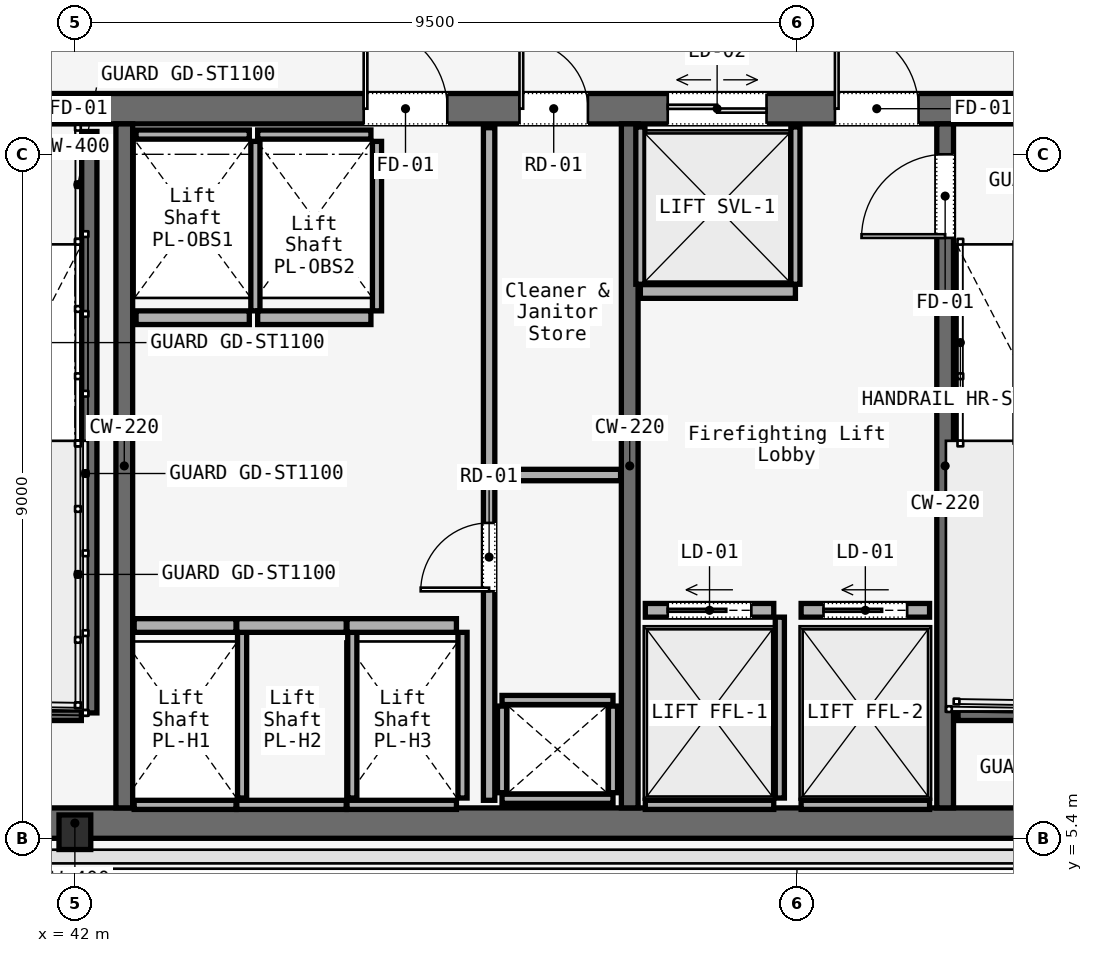
"""IFC4 building model, lengths in metres.
Left out: names, types, materials, properties, quantities, classifications, styles, units other than length and angle.
Written with IfcOpenShell. Run it as: python <this file> out.ifc"""

import sys

from ifc_helpers import new_model, si_unit, direction, frame, frame_2d, origin, origin_2d, place, context, subcontext, project, spatial, rectangle, i_section, extrude, element, fill, save


model = new_model("IFC4")
c1 = context("Model", 3, precision=1e-05, world=origin(), true_north=direction((0.0, 1.0)))
c2 = subcontext(c1, "Body", "Model", "MODEL_VIEW")
j1 = project(units=[si_unit("LENGTHUNIT", "METRE"), si_unit("PLANEANGLEUNIT", "RADIAN")], contexts=[c1])
p1 = place(None, origin())
s1 = spatial("IfcSite", under=j1, at=p1, CompositionType="ELEMENT")
p2 = place(p1, origin())
s2 = spatial("IfcBuilding", under=s1, at=p2, CompositionType="ELEMENT")
p3 = place(p2, frame((0.0, 0.0, 161.2)))
s3 = spatial("IfcBuildingStorey", under=s2, at=p3, CompositionType="ELEMENT", Elevation=161.2)
p4 = place(p3, frame((26.45, 15.0, 0.0), z_axis=(0.0, 0.0, 1.0), x_axis=(1.0, 0.0, 0.0)))
e1 = element("IfcWall", 1, at=p4, inside=s3, PredefinedType="SOLIDWALL", context=c2, shape_type="SweptSolid", body=[
    extrude(rectangle(XDim=31.1, YDim=0.4, at=frame_2d((15.55, 0.0))), origin(), (0.0, 0.0, 1.0), 3.58),
])
p5 = place(p4, frame((1.65, 0.0, 0.0)))
e2 = element("IfcOpeningElement", 2, at=p5, cuts=e1, PredefinedType="OPENING", context=c2, shape_type="SweptSolid", body=[
    extrude(rectangle(XDim=1.1, YDim=2.2, at=frame_2d((0.55, 1.1))), frame((0.0, 0.2, 0.0), z_axis=(0.0, -1.0, 0.0), x_axis=(1.0, 0.0, 0.0)), (0.0, 0.0, 1.0), 0.4),
])
p6 = place(p4, frame((13.65, 0.0, 0.0)))
e3 = element("IfcOpeningElement", 3, at=p6, cuts=e1, PredefinedType="OPENING", context=c2, shape_type="SweptSolid", body=[
    extrude(rectangle(XDim=1.1, YDim=2.2, at=frame_2d((0.55, 1.1))), frame((0.0, 0.2, 0.0), z_axis=(0.0, -1.0, 0.0), x_axis=(1.0, 0.0, 0.0)), (0.0, 0.0, 1.0), 0.4),
])
p7 = place(p4, frame((25.55, 0.0, 0.0)))
e4 = element("IfcOpeningElement", 4, at=p7, cuts=e1, PredefinedType="OPENING", context=c2, shape_type="SweptSolid", body=[
    extrude(rectangle(XDim=1.1, YDim=2.2, at=frame_2d((0.55, 1.1))), frame((0.0, 0.2, 0.0), z_axis=(0.0, -1.0, 0.0), x_axis=(1.0, 0.0, 0.0)), (0.0, 0.0, 1.0), 0.4),
])
p8 = place(p4, frame((10.7, 0.0, 0.0)))
e5 = element("IfcOpeningElement", 5, at=p8, cuts=e1, PredefinedType="OPENING", context=c2, shape_type="SweptSolid", body=[
    extrude(rectangle(XDim=1.4, YDim=2.2, at=frame_2d((0.7, 1.1))), frame((0.0, 0.2, 0.0), z_axis=(0.0, -1.0, 0.0), x_axis=(1.0, 0.0, 0.0)), (0.0, 0.0, 1.0), 0.4),
])
p9 = place(p4, frame((19.35, 0.0, 0.0)))
e6 = element("IfcOpeningElement", 6, at=p9, cuts=e1, PredefinedType="OPENING", context=c2, shape_type="SweptSolid", body=[
    extrude(rectangle(XDim=1.1, YDim=2.2, at=frame_2d((0.55, 1.1))), frame((0.0, 0.2, 0.0), z_axis=(0.0, -1.0, 0.0), x_axis=(1.0, 0.0, 0.0)), (0.0, 0.0, 1.0), 0.4),
])
p10 = place(p4, frame((21.4, 0.0, 0.0)))
e7 = element("IfcOpeningElement", 7, at=p10, cuts=e1, PredefinedType="OPENING", context=c2, shape_type="SweptSolid", body=[
    extrude(rectangle(XDim=0.9, YDim=2.1, at=frame_2d((0.45, 1.05))), frame((0.0, 0.2, 0.0), z_axis=(0.0, -1.0, 0.0), x_axis=(1.0, 0.0, 0.0)), (0.0, 0.0, 1.0), 0.4),
])
p11 = place(p4, frame((23.35, 0.0, 0.0)))
e8 = element("IfcOpeningElement", 8, at=p11, cuts=e1, PredefinedType="OPENING", context=c2, shape_type="SweptSolid", body=[
    extrude(rectangle(XDim=1.3, YDim=2.3, at=frame_2d((0.65, 1.15))), frame((0.0, 0.2, 0.0), z_axis=(0.0, -1.0, 0.0), x_axis=(1.0, 0.0, 0.0)), (0.0, 0.0, 1.0), 0.4),
])
p12 = place(p3, frame((26.45, 5.6, 0.0), z_axis=(0.0, 0.0, 1.0), x_axis=(1.0, 0.0, 0.0)))
e9 = element("IfcWall", 9, at=p12, inside=s3, PredefinedType="SOLIDWALL", context=c2, shape_type="SweptSolid", body=[
    extrude(rectangle(XDim=31.1, YDim=0.4, at=frame_2d((15.55, 0.0))), origin(), (0.0, 0.0, 1.0), 3.58),
])
for number, where, z_axis, x_axis in (
    (10, (42.65, 5.8, 0.0), (0.0, 0.0, 1.0), (0.0, 1.0, 0.0)),
    (11, (49.3, 5.8, 0.0), (0.0, 0.0, 1.0), (0.0, 1.0, 0.0)),
):
    element("IfcWall", number, at=place(p3, frame(where, z_axis=z_axis, x_axis=x_axis)), inside=s3, PredefinedType="SOLIDWALL", context=c2, shape_type="SweptSolid", body=[
        extrude(rectangle(XDim=9.0, YDim=0.22, at=frame_2d((4.5, 0.0))), origin(), (0.0, 0.0, 1.0), 3.58),
    ])
p13 = place(p3, frame((53.45, 5.8, 0.0), z_axis=(0.0, 0.0, 1.0), x_axis=(0.0, 1.0, 0.0)))
e12 = element("IfcWall", 12, at=p13, inside=s3, PredefinedType="SOLIDWALL", context=c2, shape_type="SweptSolid", body=[
    extrude(rectangle(XDim=9.0, YDim=0.22, at=frame_2d((4.5, 0.0))), origin(), (0.0, 0.0, 1.0), 3.58),
])
p14 = place(p13, frame((7.5, 0.0, 0.0)))
e13 = element("IfcOpeningElement", 13, at=p14, cuts=e12, PredefinedType="OPENING", context=c2, shape_type="SweptSolid", body=[
    extrude(rectangle(XDim=1.1, YDim=2.2, at=frame_2d((0.55, 1.1))), frame((0.0, 0.11, 0.0), z_axis=(0.0, -1.0, 0.0), x_axis=(1.0, 0.0, 0.0)), (0.0, 0.0, 1.0), 0.22),
])
p15 = place(p3, frame((42.0, 5.48, 0.0), z_axis=(0.0, 0.0, 1.0), x_axis=(1.0, 0.0, 0.0)))
e14 = element("IfcColumn", 14, at=p15, inside=s3, PredefinedType="COLUMN", context=c2, shape_type="SweptSolid", body=[
    extrude(i_section(OverallWidth=0.418, OverallDepth=0.455, WebThickness=0.042, FlangeThickness=0.052, FilletRadius=0.015, at=origin_2d()), origin(), (0.0, 0.0, 1.0), 3.58),
])
p16 = place(p3, frame((42.19, 14.7, 0.0), z_axis=(0.0, 0.0, 1.0), x_axis=(0.0, -1.0, 0.0)))
e15 = element("IfcWall", 15, at=p16, inside=s3, PredefinedType="SOLIDWALL", context=c2, shape_type="SweptSolid", body=[
    extrude(rectangle(XDim=7.65, YDim=0.2, at=frame_2d((3.825, 0.0))), origin(), (0.0, 0.0, 1.0), 3.8),
])
for number, where, z_axis, x_axis in (
    (16, (38.97, 7.05, 0.0), (0.0, 0.0, 1.0), (1.0, 0.0, 0.0)),
    (17, (53.62, 7.05, 0.0), (0.0, 0.0, 1.0), (1.0, 0.0, 0.0)),
):
    element("IfcWall", number, at=place(p3, frame(where, z_axis=z_axis, x_axis=x_axis)), inside=s3, PredefinedType="SOLIDWALL", context=c2, shape_type="SweptSolid", body=[
        extrude(rectangle(XDim=3.115, YDim=0.2, at=frame_2d((1.558, 0.0))), origin(), (0.0, 0.0, 1.0), 3.8),
    ])
for number, where, z_axis, x_axis in (
    (18, (47.62, 5.92, 0.0), (0.0, 0.0, 1.0), (1.0, 0.0, 0.0)),
    (19, (47.62, 7.22, 0.0), (0.0, 0.0, 1.0), (1.0, 0.0, 0.0)),
):
    element("IfcWall", number, at=place(p3, frame(where, z_axis=z_axis, x_axis=x_axis)), inside=s3, PredefinedType="SOLIDWALL", context=c2, shape_type="SweptSolid", body=[
        extrude(rectangle(XDim=1.46, YDim=0.12, at=frame_2d((0.73, 0.0))), origin(), (0.0, 0.0, 1.0), 3.01),
    ])
for number, where, z_axis, x_axis in (
    (20, (47.62, 6.0, 0.0), (0.0, 0.0, 1.0), (0.0, 1.0, 0.0)),
    (21, (49.08, 6.0, 0.0), (0.0, 0.0, 1.0), (0.0, 1.0, 0.0)),
):
    element("IfcWall", number, at=place(p3, frame(where, z_axis=z_axis, x_axis=x_axis)), inside=s3, PredefinedType="SOLIDWALL", context=c2, shape_type="SweptSolid", body=[
        extrude(rectangle(XDim=1.14, YDim=0.12, at=frame_2d((0.57, 0.0))), origin(), (0.0, 0.0, 1.0), 3.01),
    ])
p17 = place(p3, frame((47.45, 5.9, 0.0), z_axis=(0.0, 0.0, 1.0), x_axis=(0.0, 1.0, 0.0)))
e22 = element("IfcWall", 22, at=p17, inside=s3, PredefinedType="PARTITIONING", context=c2, shape_type="SweptSolid", body=[
    extrude(rectangle(XDim=8.85, YDim=0.15, at=frame_2d((4.425, 0.0))), origin(), (0.0, 0.0, 1.0), 3.01),
])
p18 = place(p17, frame((2.75, 0.0, 0.0)))
e23 = element("IfcOpeningElement", 23, at=p18, cuts=e22, PredefinedType="OPENING", context=c2, shape_type="SweptSolid", body=[
    extrude(rectangle(XDim=0.9, YDim=2.1, at=frame_2d((0.45, 1.05))), frame((0.0, 0.075, 0.0), z_axis=(0.0, -1.0, 0.0), x_axis=(1.0, 0.0, 0.0)), (0.0, 0.0, 1.0), 0.15),
])
p19 = place(p3, frame((47.45, 10.18, 0.0), z_axis=(0.0, 0.0, 1.0), x_axis=(1.0, 0.0, 0.0)))
e24 = element("IfcWall", 24, at=p19, inside=s3, PredefinedType="PARTITIONING", context=c2, shape_type="SweptSolid", body=[
    extrude(rectangle(XDim=1.73, YDim=0.15, at=frame_2d((0.865, 0.0))), origin(), (0.0, 0.0, 1.0), 3.01),
])
p20 = place(p3, frame((42.78, 8.2, 0.0), z_axis=(0.0, 0.0, 1.0), x_axis=(1.0, 0.0, 0.0)))
e25 = element("IfcWall", 25, at=p20, inside=s3, PredefinedType="SOLIDWALL", context=c2, shape_type="SweptSolid", body=[
    extrude(rectangle(XDim=1.34, YDim=0.18, at=frame_2d((0.67, 0.0))), origin(), (0.0, 0.0, 1.0), 3.01),
])
p21 = place(p3, frame((42.78, 5.84, 0.0), z_axis=(0.0, 0.0, 1.0), x_axis=(1.0, 0.0, 0.0)))
e26 = element("IfcWall", 26, at=p21, inside=s3, PredefinedType="SOLIDWALL", context=c2, shape_type="SweptSolid", body=[
    extrude(rectangle(XDim=1.34, YDim=0.12, at=frame_2d((0.67, 0.0))), origin(), (0.0, 0.0, 1.0), 3.01),
])
p22 = place(p3, frame((44.2, 5.93, 0.0), z_axis=(0.0, 0.0, 1.0), x_axis=(0.0, 1.0, 0.0)))
e27 = element("IfcWall", 27, at=p22, inside=s3, PredefinedType="SOLIDWALL", context=c2, shape_type="SweptSolid", body=[
    extrude(rectangle(XDim=2.18, YDim=0.12, at=frame_2d((1.09, 0.0))), origin(), (0.0, 0.0, 1.0), 3.01),
])
p23 = place(p3, frame((44.13, 8.2, 0.0), z_axis=(0.0, 0.0, 1.0), x_axis=(1.0, 0.0, 0.0)))
e28 = element("IfcWall", 28, at=p23, inside=s3, PredefinedType="SOLIDWALL", context=c2, shape_type="SweptSolid", body=[
    extrude(rectangle(XDim=1.44, YDim=0.18, at=frame_2d((0.72, 0.0))), origin(), (0.0, 0.0, 1.0), 3.01),
])
p24 = place(p3, frame((44.13, 5.84, 0.0), z_axis=(0.0, 0.0, 1.0), x_axis=(1.0, 0.0, 0.0)))
e29 = element("IfcWall", 29, at=p24, inside=s3, PredefinedType="SOLIDWALL", context=c2, shape_type="SweptSolid", body=[
    extrude(rectangle(XDim=1.44, YDim=0.12, at=frame_2d((0.72, 0.0))), origin(), (0.0, 0.0, 1.0), 3.01),
])
p25 = place(p3, frame((45.65, 5.93, 0.0), z_axis=(0.0, 0.0, 1.0), x_axis=(0.0, 1.0, 0.0)))
e30 = element("IfcWall", 30, at=p25, inside=s3, PredefinedType="SOLIDWALL", context=c2, shape_type="SweptSolid", body=[
    extrude(rectangle(XDim=2.18, YDim=0.12, at=frame_2d((1.09, 0.0))), origin(), (0.0, 0.0, 1.0), 3.01),
])
p26 = place(p3, frame((45.58, 8.2, 0.0), z_axis=(0.0, 0.0, 1.0), x_axis=(1.0, 0.0, 0.0)))
e31 = element("IfcWall", 31, at=p26, inside=s3, PredefinedType="SOLIDWALL", context=c2, shape_type="SweptSolid", body=[
    extrude(rectangle(XDim=1.44, YDim=0.18, at=frame_2d((0.72, 0.0))), origin(), (0.0, 0.0, 1.0), 3.01),
])
p27 = place(p3, frame((45.58, 5.84, 0.0), z_axis=(0.0, 0.0, 1.0), x_axis=(1.0, 0.0, 0.0)))
e32 = element("IfcWall", 32, at=p27, inside=s3, PredefinedType="SOLIDWALL", context=c2, shape_type="SweptSolid", body=[
    extrude(rectangle(XDim=1.44, YDim=0.12, at=frame_2d((0.72, 0.0))), origin(), (0.0, 0.0, 1.0), 3.01),
])
p28 = place(p3, frame((47.1, 5.93, 0.0), z_axis=(0.0, 0.0, 1.0), x_axis=(0.0, 1.0, 0.0)))
e33 = element("IfcWall", 33, at=p28, inside=s3, PredefinedType="SOLIDWALL", context=c2, shape_type="SweptSolid", body=[
    extrude(rectangle(XDim=2.18, YDim=0.12, at=frame_2d((1.09, 0.0))), origin(), (0.0, 0.0, 1.0), 3.01),
])
p29 = place(p3, frame((42.805, 12.25, 0.0), z_axis=(0.0, 0.0, 1.0), x_axis=(1.0, 0.0, 0.0)))
e34 = element("IfcWall", 34, at=p29, inside=s3, PredefinedType="SOLIDWALL", context=c2, shape_type="SweptSolid", body=[
    extrude(rectangle(XDim=1.49, YDim=0.18, at=frame_2d((0.745, 0.0))), origin(), (0.0, 0.0, 1.0), 3.01),
])
p30 = place(p3, frame((42.805, 14.66, 0.0), z_axis=(0.0, 0.0, 1.0), x_axis=(1.0, 0.0, 0.0)))
e35 = element("IfcWall", 35, at=p30, inside=s3, PredefinedType="SOLIDWALL", context=c2, shape_type="SweptSolid", body=[
    extrude(rectangle(XDim=1.49, YDim=0.12, at=frame_2d((0.745, 0.0))), origin(), (0.0, 0.0, 1.0), 3.01),
])
p31 = place(p3, frame((44.375, 12.34, 0.0), z_axis=(0.0, 0.0, 1.0), x_axis=(0.0, 1.0, 0.0)))
e36 = element("IfcWall", 36, at=p31, inside=s3, PredefinedType="SOLIDWALL", context=c2, shape_type="SweptSolid", body=[
    extrude(rectangle(XDim=2.23, YDim=0.12, at=frame_2d((1.115, 0.0))), origin(), (0.0, 0.0, 1.0), 3.01),
])
p32 = place(p3, frame((44.405, 12.25, 0.0), z_axis=(0.0, 0.0, 1.0), x_axis=(1.0, 0.0, 0.0)))
e37 = element("IfcWall", 37, at=p32, inside=s3, PredefinedType="SOLIDWALL", context=c2, shape_type="SweptSolid", body=[
    extrude(rectangle(XDim=1.49, YDim=0.18, at=frame_2d((0.745, 0.0))), origin(), (0.0, 0.0, 1.0), 3.01),
])
p33 = place(p3, frame((44.405, 14.66, 0.0), z_axis=(0.0, 0.0, 1.0), x_axis=(1.0, 0.0, 0.0)))
e38 = element("IfcWall", 38, at=p33, inside=s3, PredefinedType="SOLIDWALL", context=c2, shape_type="SweptSolid", body=[
    extrude(rectangle(XDim=1.49, YDim=0.12, at=frame_2d((0.745, 0.0))), origin(), (0.0, 0.0, 1.0), 3.01),
])
p34 = place(p3, frame((45.975, 12.34, 0.0), z_axis=(0.0, 0.0, 1.0), x_axis=(0.0, 1.0, 0.0)))
e39 = element("IfcWall", 39, at=p34, inside=s3, PredefinedType="SOLIDWALL", context=c2, shape_type="SweptSolid", body=[
    extrude(rectangle(XDim=2.23, YDim=0.12, at=frame_2d((1.115, 0.0))), origin(), (0.0, 0.0, 1.0), 3.01),
])
p35 = place(p3, frame((49.505, 8.4, 0.0), z_axis=(0.0, 0.0, 1.0), x_axis=(1.0, 0.0, 0.0)))
e40 = element("IfcWall", 40, at=p35, inside=s3, PredefinedType="SOLIDWALL", context=c2, shape_type="SweptSolid", body=[
    extrude(rectangle(XDim=1.69, YDim=0.18, at=frame_2d((0.845, 0.0))), origin(), (0.0, 0.0, 1.0), 3.01),
])
p36 = place(p35, frame((0.295, 0.0, 0.0)))
e41 = element("IfcOpeningElement", 41, at=p36, cuts=e40, PredefinedType="OPENING", context=c2, shape_type="SweptSolid", body=[
    extrude(rectangle(XDim=1.1, YDim=2.2, at=frame_2d((0.55, 1.1))), frame((0.0, 0.09, 0.0), z_axis=(0.0, -1.0, 0.0), x_axis=(1.0, 0.0, 0.0)), (0.0, 0.0, 1.0), 0.18),
])
p37 = place(p3, frame((49.505, 5.84, 0.0), z_axis=(0.0, 0.0, 1.0), x_axis=(1.0, 0.0, 0.0)))
e42 = element("IfcWall", 42, at=p37, inside=s3, PredefinedType="SOLIDWALL", context=c2, shape_type="SweptSolid", body=[
    extrude(rectangle(XDim=1.69, YDim=0.12, at=frame_2d((0.845, 0.0))), origin(), (0.0, 0.0, 1.0), 3.01),
])
p38 = place(p3, frame((51.275, 5.93, 0.0), z_axis=(0.0, 0.0, 1.0), x_axis=(0.0, 1.0, 0.0)))
e43 = element("IfcWall", 43, at=p38, inside=s3, PredefinedType="SOLIDWALL", context=c2, shape_type="SweptSolid", body=[
    extrude(rectangle(XDim=2.38, YDim=0.12, at=frame_2d((1.19, 0.0))), origin(), (0.0, 0.0, 1.0), 3.01),
])
p39 = place(p3, frame((51.555, 8.4, 0.0), z_axis=(0.0, 0.0, 1.0), x_axis=(1.0, 0.0, 0.0)))
e44 = element("IfcWall", 44, at=p39, inside=s3, PredefinedType="SOLIDWALL", context=c2, shape_type="SweptSolid", body=[
    extrude(rectangle(XDim=1.69, YDim=0.18, at=frame_2d((0.845, 0.0))), origin(), (0.0, 0.0, 1.0), 3.01),
])
p40 = place(p39, frame((0.295, 0.0, 0.0)))
e45 = element("IfcOpeningElement", 45, at=p40, cuts=e44, PredefinedType="OPENING", context=c2, shape_type="SweptSolid", body=[
    extrude(rectangle(XDim=1.1, YDim=2.2, at=frame_2d((0.55, 1.1))), frame((0.0, 0.09, 0.0), z_axis=(0.0, -1.0, 0.0), x_axis=(1.0, 0.0, 0.0)), (0.0, 0.0, 1.0), 0.18),
])
p41 = place(p3, frame((51.555, 5.84, 0.0), z_axis=(0.0, 0.0, 1.0), x_axis=(1.0, 0.0, 0.0)))
e46 = element("IfcWall", 46, at=p41, inside=s3, PredefinedType="SOLIDWALL", context=c2, shape_type="SweptSolid", body=[
    extrude(rectangle(XDim=1.69, YDim=0.12, at=frame_2d((0.845, 0.0))), origin(), (0.0, 0.0, 1.0), 3.01),
])
p42 = place(p3, frame((49.44, 12.595, 0.0), z_axis=(0.0, 0.0, 1.0), x_axis=(1.0, 0.0, 0.0)))
e47 = element("IfcWall", 47, at=p42, inside=s3, PredefinedType="SOLIDWALL", context=c2, shape_type="SweptSolid", body=[
    extrude(rectangle(XDim=2.04, YDim=0.18, at=frame_2d((1.02, 0.0))), origin(), (0.0, 0.0, 1.0), 3.01),
])
for number, where, z_axis, x_axis in (
    (48, (49.44, 12.69, 0.0), (0.0, 0.0, 1.0), (0.0, 1.0, 0.0)),
    (49, (51.48, 12.69, 0.0), (0.0, 0.0, 1.0), (0.0, 1.0, 0.0)),
):
    element("IfcWall", number, at=place(p3, frame(where, z_axis=z_axis, x_axis=x_axis)), inside=s3, PredefinedType="SOLIDWALL", context=c2, shape_type="SweptSolid", body=[
        extrude(rectangle(XDim=2.07, YDim=0.12, at=frame_2d((1.035, 0.0))), origin(), (0.0, 0.0, 1.0), 3.01),
    ])
p43 = place(p7, origin())
e50 = element("IfcDoor", 50, at=p43, inside=s3, OperationType="SINGLE_SWING_RIGHT", PredefinedType="DOOR", context=c2, shape_type="SweptSolid", body=[
    extrude(rectangle(XDim=1.1, YDim=2.2, at=frame_2d((0.55, 1.1))), frame((0.0, 0.025, 0.0), z_axis=(0.0, -1.0, 0.0), x_axis=(1.0, 0.0, 0.0)), (0.0, 0.0, 1.0), 0.05),
])
fill(e4, e50)
p44 = place(p9, origin())
e51 = element("IfcDoor", 51, at=p44, inside=s3, OperationType="SINGLE_SWING_LEFT", PredefinedType="DOOR", context=c2, shape_type="SweptSolid", body=[
    extrude(rectangle(XDim=1.1, YDim=2.2, at=frame_2d((0.55, 1.1))), frame((0.0, 0.025, 0.0), z_axis=(0.0, -1.0, 0.0), x_axis=(1.0, 0.0, 0.0)), (0.0, 0.0, 1.0), 0.05),
])
fill(e6, e51)
p45 = place(p10, origin())
e52 = element("IfcDoor", 52, at=p45, inside=s3, OperationType="SINGLE_SWING_LEFT", PredefinedType="DOOR", context=c2, shape_type="SweptSolid", body=[
    extrude(rectangle(XDim=0.9, YDim=2.1, at=frame_2d((0.45, 1.05))), frame((0.0, 0.025, 0.0), z_axis=(0.0, -1.0, 0.0), x_axis=(1.0, 0.0, 0.0)), (0.0, 0.0, 1.0), 0.05),
])
fill(e7, e52)
p46 = place(p14, origin())
e53 = element("IfcDoor", 53, at=p46, inside=s3, OperationType="SINGLE_SWING_LEFT", PredefinedType="DOOR", context=c2, shape_type="SweptSolid", body=[
    extrude(rectangle(XDim=1.1, YDim=2.2, at=frame_2d((0.55, 1.1))), frame((0.0, 0.025, 0.0), z_axis=(0.0, -1.0, 0.0), x_axis=(1.0, 0.0, 0.0)), (0.0, 0.0, 1.0), 0.05),
])
fill(e13, e53)
p47 = place(p18, origin())
e54 = element("IfcDoor", 54, at=p47, inside=s3, OperationType="SINGLE_SWING_RIGHT", PredefinedType="DOOR", context=c2, shape_type="SweptSolid", body=[
    extrude(rectangle(XDim=0.9, YDim=2.1, at=frame_2d((0.45, 1.05))), frame((0.0, 0.025, 0.0), z_axis=(0.0, -1.0, 0.0), x_axis=(1.0, 0.0, 0.0)), (0.0, 0.0, 1.0), 0.05),
])
fill(e23, e54)
p48 = place(p36, origin())
e55 = element("IfcDoor", 55, at=p48, inside=s3, OperationType="SLIDING_TO_LEFT", PredefinedType="DOOR", context=c2, shape_type="SweptSolid", body=[
    extrude(rectangle(XDim=1.1, YDim=2.2, at=frame_2d((0.55, 1.1))), frame((0.0, 0.025, 0.0), z_axis=(0.0, -1.0, 0.0), x_axis=(1.0, 0.0, 0.0)), (0.0, 0.0, 1.0), 0.05),
])
fill(e41, e55)
p49 = place(p40, origin())
e56 = element("IfcDoor", 56, at=p49, inside=s3, OperationType="SLIDING_TO_LEFT", PredefinedType="DOOR", context=c2, shape_type="SweptSolid", body=[
    extrude(rectangle(XDim=1.1, YDim=2.2, at=frame_2d((0.55, 1.1))), frame((0.0, 0.025, 0.0), z_axis=(0.0, -1.0, 0.0), x_axis=(1.0, 0.0, 0.0)), (0.0, 0.0, 1.0), 0.05),
])
fill(e45, e56)
p50 = place(p11, origin())
e57 = element("IfcDoor", 57, at=p50, inside=s3, OperationType="DOUBLE_DOOR_SLIDING", PredefinedType="DOOR", context=c2, shape_type="SweptSolid", body=[
    extrude(rectangle(XDim=1.3, YDim=2.3, at=frame_2d((0.65, 1.15))), frame((0.0, 0.025, 0.0), z_axis=(0.0, -1.0, 0.0), x_axis=(1.0, 0.0, 0.0)), (0.0, 0.0, 1.0), 0.05),
])
fill(e8, e57)
save(model, sys.argv[1])
